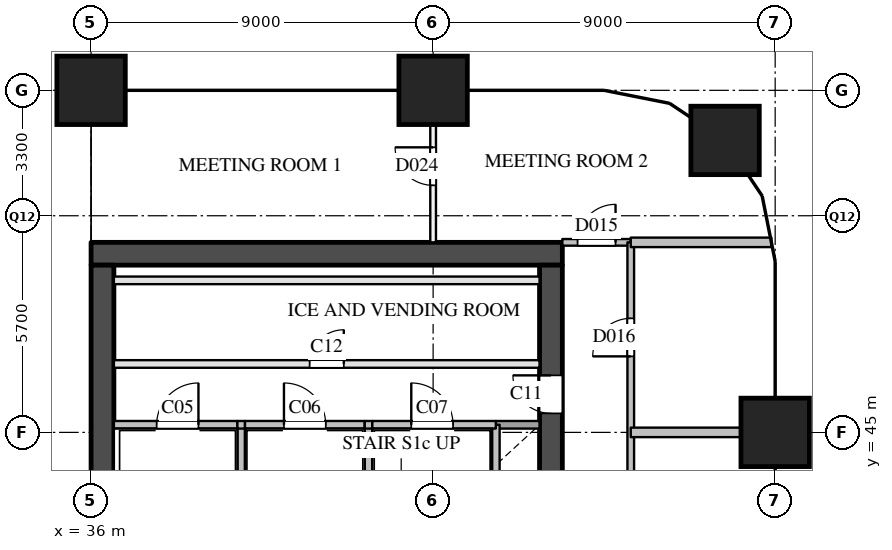
"""IFC4 building model, lengths in metres.
Left out: names, types, materials, properties, quantities, classifications, styles, units other than length and angle.
Written with IfcOpenShell. Run it as: python <this file> out.ifc"""

import sys

from ifc_helpers import new_model, si_unit, direction, frame, frame_2d, origin, origin_2d, place, context, subcontext, project, spatial, rectangle, extrude, element, fill, save


model = new_model("IFC4")
c1 = context("Model", 3, precision=1e-05, world=origin(), true_north=direction((0.0, 1.0)))
c2 = subcontext(c1, "Body", "Model", "MODEL_VIEW")
j1 = project(units=[si_unit("LENGTHUNIT", "METRE"), si_unit("PLANEANGLEUNIT", "RADIAN")], contexts=[c1])
p1 = place(None, origin())
s1 = spatial("IfcSite", under=j1, at=p1, CompositionType="ELEMENT")
p2 = place(p1, origin())
s2 = spatial("IfcBuilding", under=s1, at=p2, CompositionType="ELEMENT")
p3 = place(p2, frame((0.0, 0.0, 14.0)))
s3 = spatial("IfcBuildingStorey", under=s2, at=p3, CompositionType="ELEMENT", Elevation=14.0)
for number, where, z_axis, x_axis in (
    (1, (36.0, 54.0, 0.0), (0.0, 0.0, 1.0), (1.0, 0.0, 0.0)),
    (2, (45.0, 54.0, 0.0), (0.0, 0.0, 1.0), (1.0, 0.0, 0.0)),
    (3, (54.0, 45.0, 0.0), (0.0, 0.0, 1.0), (1.0, 0.0, 0.0)),
    (4, (52.682, 52.682, 0.0), (0.0, 0.0, 1.0), (1.0, 0.0, 0.0)),
):
    element("IfcColumn", number, at=place(p3, frame(where, z_axis=z_axis, x_axis=x_axis)), inside=s3, PredefinedType="COLUMN", context=c2, shape_type="SweptSolid", body=[
        extrude(rectangle(XDim=1.8, YDim=1.8, at=origin_2d()), origin(), (0.0, 0.0, 1.0), 7.0),
    ])
p4 = place(p3, frame((36.0, 49.7, 0.0), z_axis=(0.0, 0.0, 1.0), x_axis=(1.0, 0.0, 0.0)))
e5 = element("IfcWall", 5, at=p4, inside=s3, PredefinedType="SHEAR", context=c2, shape_type="SweptSolid", body=[
    extrude(rectangle(XDim=12.4, YDim=0.6, at=frame_2d((6.2, 0.0))), origin(), (0.0, 0.0, 1.0), 6.59),
])
p5 = place(p3, frame((36.3, 29.1, 0.0), z_axis=(0.0, 0.0, 1.0), x_axis=(0.0, 1.0, 0.0)))
e6 = element("IfcWall", 6, at=p5, inside=s3, PredefinedType="SHEAR", context=c2, shape_type="SweptSolid", body=[
    extrude(rectangle(XDim=20.3, YDim=0.6, at=frame_2d((10.15, 0.0))), origin(), (0.0, 0.0, 1.0), 6.59),
])
p6 = place(p3, frame((48.1, 29.1, 0.0), z_axis=(0.0, 0.0, 1.0), x_axis=(0.0, 1.0, 0.0)))
e7 = element("IfcWall", 7, at=p6, inside=s3, PredefinedType="SHEAR", context=c2, shape_type="SweptSolid", body=[
    extrude(rectangle(XDim=20.3, YDim=0.6, at=frame_2d((10.15, 0.0))), origin(), (0.0, 0.0, 1.0), 6.59),
])
p7 = place(p6, frame((12.5, 0.0, 0.0)))
e8 = element("IfcOpeningElement", 8, at=p7, cuts=e7, PredefinedType="OPENING", context=c2, shape_type="SweptSolid", body=[
    extrude(rectangle(XDim=0.7, YDim=2.1, at=frame_2d((0.35, 1.05))), frame((0.0, 0.31, 0.0), z_axis=(0.0, -1.0, 0.0), x_axis=(1.0, 0.0, 0.0)), (0.0, 0.0, 1.0), 0.62),
])
p8 = place(p6, frame((3.9, 0.0, 0.0)))
e9 = element("IfcOpeningElement", 9, at=p8, cuts=e7, PredefinedType="OPENING", context=c2, shape_type="SweptSolid", body=[
    extrude(rectangle(XDim=1.8, YDim=2.1, at=frame_2d((0.9, 1.05))), frame((0.0, 0.31, 0.0), z_axis=(0.0, -1.0, 0.0), x_axis=(1.0, 0.0, 0.0)), (0.0, 0.0, 1.0), 0.62),
])
p9 = place(p6, frame((16.4, 0.0, 0.0)))
e10 = element("IfcOpeningElement", 10, at=p9, cuts=e7, PredefinedType="OPENING", context=c2, shape_type="SweptSolid", body=[
    extrude(rectangle(XDim=1.0, YDim=2.1, at=frame_2d((0.5, 1.05))), frame((0.0, 0.31, 0.0), z_axis=(0.0, -1.0, 0.0), x_axis=(1.0, 0.0, 0.0)), (0.0, 0.0, 1.0), 0.62),
])
for number, where, z_axis, x_axis in (
    (11, (39.95, 43.58, 0.0), (0.0, 0.0, 1.0), (0.0, 1.0, 0.0)),
    (12, (43.3, 43.58, 0.0), (0.0, 0.0, 1.0), (0.0, 1.0, 0.0)),
    (13, (46.65, 43.58, 0.0), (0.0, 0.0, 1.0), (0.0, 1.0, 0.0)),
):
    element("IfcWall", number, at=place(p3, frame(where, z_axis=z_axis, x_axis=x_axis)), inside=s3, PredefinedType="SOLIDWALL", context=c2, shape_type="SweptSolid", body=[
        extrude(rectangle(XDim=1.62, YDim=0.2, at=frame_2d((0.81, 0.0))), origin(), (0.0, 0.0, 1.0), 6.59),
    ])
p10 = place(p3, frame((46.65, 45.2, 0.0), z_axis=(0.0, 0.0, 1.0), x_axis=(1.0, 0.0, 0.0)))
e14 = element("IfcWall", 14, at=p10, inside=s3, PredefinedType="SOLIDWALL", context=c2, shape_type="SweptSolid", body=[
    extrude(rectangle(XDim=1.15, YDim=0.2, at=frame_2d((0.575, 0.0))), origin(), (0.0, 0.0, 1.0), 6.59),
])
p11 = place(p3, frame((36.6, 45.2, 0.0), z_axis=(0.0, 0.0, 1.0), x_axis=(1.0, 0.0, 0.0)))
e15 = element("IfcWall", 15, at=p11, inside=s3, PredefinedType="SOLIDWALL", context=c2, shape_type="SweptSolid", body=[
    extrude(rectangle(XDim=3.25, YDim=0.2, at=frame_2d((1.625, 0.0))), origin(), (0.0, 0.0, 1.0), 6.59),
])
p12 = place(p11, frame((1.125, 0.0, 0.0)))
e16 = element("IfcOpeningElement", 16, at=p12, cuts=e15, PredefinedType="OPENING", context=c2, shape_type="SweptSolid", body=[
    extrude(rectangle(XDim=1.1, YDim=2.1, at=frame_2d((0.55, 1.05))), frame((0.0, 0.11, 0.0), z_axis=(0.0, -1.0, 0.0), x_axis=(1.0, 0.0, 0.0)), (0.0, 0.0, 1.0), 0.22),
])
p13 = place(p3, frame((39.85, 45.2, 0.0), z_axis=(0.0, 0.0, 1.0), x_axis=(1.0, 0.0, 0.0)))
e17 = element("IfcWall", 17, at=p13, inside=s3, PredefinedType="SOLIDWALL", context=c2, shape_type="SweptSolid", body=[
    extrude(rectangle(XDim=0.2, YDim=0.2, at=frame_2d((0.1, 0.0))), origin(), (0.0, 0.0, 1.0), 6.59),
])
p14 = place(p3, frame((40.05, 45.2, 0.0), z_axis=(0.0, 0.0, 1.0), x_axis=(1.0, 0.0, 0.0)))
e18 = element("IfcWall", 18, at=p14, inside=s3, PredefinedType="SOLIDWALL", context=c2, shape_type="SweptSolid", body=[
    extrude(rectangle(XDim=3.15, YDim=0.2, at=frame_2d((1.575, 0.0))), origin(), (0.0, 0.0, 1.0), 6.59),
])
p15 = place(p14, frame((1.025, 0.0, 0.0)))
e19 = element("IfcOpeningElement", 19, at=p15, cuts=e18, PredefinedType="OPENING", context=c2, shape_type="SweptSolid", body=[
    extrude(rectangle(XDim=1.1, YDim=2.1, at=frame_2d((0.55, 1.05))), frame((0.0, 0.11, 0.0), z_axis=(0.0, -1.0, 0.0), x_axis=(1.0, 0.0, 0.0)), (0.0, 0.0, 1.0), 0.22),
])
p16 = place(p3, frame((43.2, 45.2, 0.0), z_axis=(0.0, 0.0, 1.0), x_axis=(1.0, 0.0, 0.0)))
e20 = element("IfcWall", 20, at=p16, inside=s3, PredefinedType="SOLIDWALL", context=c2, shape_type="SweptSolid", body=[
    extrude(rectangle(XDim=0.2, YDim=0.2, at=frame_2d((0.1, 0.0))), origin(), (0.0, 0.0, 1.0), 6.59),
])
p17 = place(p3, frame((43.4, 45.2, 0.0), z_axis=(0.0, 0.0, 1.0), x_axis=(1.0, 0.0, 0.0)))
e21 = element("IfcWall", 21, at=p17, inside=s3, PredefinedType="SOLIDWALL", context=c2, shape_type="SweptSolid", body=[
    extrude(rectangle(XDim=3.25, YDim=0.2, at=frame_2d((1.625, 0.0))), origin(), (0.0, 0.0, 1.0), 6.59),
])
p18 = place(p17, frame((1.025, 0.0, 0.0)))
e22 = element("IfcOpeningElement", 22, at=p18, cuts=e21, PredefinedType="OPENING", context=c2, shape_type="SweptSolid", body=[
    extrude(rectangle(XDim=1.1, YDim=2.1, at=frame_2d((0.55, 1.05))), frame((0.0, 0.11, 0.0), z_axis=(0.0, -1.0, 0.0), x_axis=(1.0, 0.0, 0.0)), (0.0, 0.0, 1.0), 0.22),
])
p19 = place(p3, frame((36.6, 46.8, 0.0), z_axis=(0.0, 0.0, 1.0), x_axis=(1.0, 0.0, 0.0)))
e23 = element("IfcWall", 23, at=p19, inside=s3, PredefinedType="PARTITIONING", context=c2, shape_type="SweptSolid", body=[
    extrude(rectangle(XDim=11.2, YDim=0.2, at=frame_2d((5.6, 0.0))), origin(), (0.0, 0.0, 1.0), 6.59),
])
p20 = place(p19, frame((5.15, 0.0, 0.0)))
e24 = element("IfcOpeningElement", 24, at=p20, cuts=e23, PredefinedType="OPENING", context=c2, shape_type="SweptSolid", body=[
    extrude(rectangle(XDim=0.9, YDim=2.1, at=frame_2d((0.45, 1.05))), frame((0.0, 0.11, 0.0), z_axis=(0.0, -1.0, 0.0), x_axis=(1.0, 0.0, 0.0)), (0.0, 0.0, 1.0), 0.22),
])
p21 = place(p3, frame((36.6, 49.0, 0.0), z_axis=(0.0, 0.0, 1.0), x_axis=(1.0, 0.0, 0.0)))
e25 = element("IfcWall", 25, at=p21, inside=s3, PredefinedType="PARTITIONING", context=c2, shape_type="SweptSolid", body=[
    extrude(rectangle(XDim=11.2, YDim=0.2, at=frame_2d((5.6, 0.0))), origin(), (0.0, 0.0, 1.0), 6.59),
])
p22 = place(p3, frame((48.4, 50.0, 0.0), z_axis=(0.0, 0.0, 1.0), x_axis=(1.0, 0.0, 0.0)))
e26 = element("IfcWall", 26, at=p22, inside=s3, PredefinedType="PARTITIONING", context=c2, shape_type="SweptSolid", body=[
    extrude(rectangle(XDim=1.8, YDim=0.175, at=frame_2d((0.9, 0.0))), origin(), (0.0, 0.0, 1.0), 6.59),
])
p23 = place(p22, frame((0.4, 0.0, 0.0)))
e27 = element("IfcOpeningElement", 27, at=p23, cuts=e26, PredefinedType="OPENING", context=c2, shape_type="SweptSolid", body=[
    extrude(rectangle(XDim=1.0, YDim=2.1, at=frame_2d((0.5, 1.05))), frame((0.0, 0.097, 0.0), z_axis=(0.0, -1.0, 0.0), x_axis=(1.0, 0.0, 0.0)), (0.0, 0.0, 1.0), 0.195),
])
p24 = place(p3, frame((50.2, 28.5, 0.0), z_axis=(0.0, 0.0, 1.0), x_axis=(0.0, 1.0, 0.0)))
e28 = element("IfcWall", 28, at=p24, inside=s3, PredefinedType="PARTITIONING", context=c2, shape_type="SweptSolid", body=[
    extrude(rectangle(XDim=21.5, YDim=0.175, at=frame_2d((10.75, 0.0))), origin(), (0.0, 0.0, 1.0), 6.59),
])
p25 = place(p24, frame((18.5, 0.0, 0.0)))
e29 = element("IfcOpeningElement", 29, at=p25, cuts=e28, PredefinedType="OPENING", context=c2, shape_type="SweptSolid", body=[
    extrude(rectangle(XDim=1.0, YDim=2.1, at=frame_2d((0.5, 1.05))), frame((0.0, 0.097, 0.0), z_axis=(0.0, -1.0, 0.0), x_axis=(1.0, 0.0, 0.0)), (0.0, 0.0, 1.0), 0.195),
])
p26 = place(p24, frame((7.75, 0.0, 0.0)))
e30 = element("IfcOpeningElement", 30, at=p26, cuts=e28, PredefinedType="OPENING", context=c2, shape_type="SweptSolid", body=[
    extrude(rectangle(XDim=1.0, YDim=2.1, at=frame_2d((0.5, 1.05))), frame((0.0, 0.097, 0.0), z_axis=(0.0, -1.0, 0.0), x_axis=(1.0, 0.0, 0.0)), (0.0, 0.0, 1.0), 0.195),
])
p27 = place(p3, frame((45.0, 50.0, 0.0), z_axis=(0.0, 0.0, 1.0), x_axis=(0.0, 1.0, 0.0)))
e31 = element("IfcWall", 31, at=p27, inside=s3, PredefinedType="PARTITIONING", context=c2, shape_type="SweptSolid", body=[
    extrude(rectangle(XDim=4.0, YDim=0.15, at=frame_2d((2.0, 0.0))), origin(), (0.0, 0.0, 1.0), 6.59),
])
p28 = place(p27, frame((1.5, 0.0, 0.0)))
e32 = element("IfcOpeningElement", 32, at=p28, cuts=e31, PredefinedType="OPENING", context=c2, shape_type="SweptSolid", body=[
    extrude(rectangle(XDim=1.0, YDim=2.1, at=frame_2d((0.5, 1.05))), frame((0.0, 0.085, 0.0), z_axis=(0.0, -1.0, 0.0), x_axis=(1.0, 0.0, 0.0)), (0.0, 0.0, 1.0), 0.17),
])
p29 = place(p3, frame((50.2, 45.0, 0.0), z_axis=(0.0, 0.0, 1.0), x_axis=(1.0, 0.0, 0.0)))
e33 = element("IfcWall", 33, at=p29, inside=s3, PredefinedType="PARTITIONING", context=c2, shape_type="SweptSolid", body=[
    extrude(rectangle(XDim=3.8, YDim=0.25, at=frame_2d((1.9, 0.0))), origin(), (0.0, 0.0, 1.0), 6.59),
])
p30 = place(p3, frame((50.2, 50.0, 0.0), z_axis=(0.0, 0.0, 1.0), x_axis=(1.0, 0.0, 0.0)))
e34 = element("IfcWall", 34, at=p30, inside=s3, PredefinedType="PARTITIONING", context=c2, shape_type="SweptSolid", body=[
    extrude(rectangle(XDim=3.7, YDim=0.25, at=frame_2d((1.85, 0.0))), origin(), (0.0, 0.0, 1.0), 5.59),
])
p31 = place(p12, origin())
e35 = element("IfcDoor", 35, at=p31, inside=s3, OperationType="SINGLE_SWING_RIGHT", PredefinedType="DOOR", context=c2, shape_type="SweptSolid", body=[
    extrude(rectangle(XDim=1.1, YDim=2.1, at=frame_2d((0.55, 1.05))), frame((0.0, 0.025, 0.0), z_axis=(0.0, -1.0, 0.0), x_axis=(1.0, 0.0, 0.0)), (0.0, 0.0, 1.0), 0.05),
])
fill(e16, e35)
p32 = place(p15, origin())
e36 = element("IfcDoor", 36, at=p32, inside=s3, OperationType="SINGLE_SWING_LEFT", PredefinedType="DOOR", context=c2, shape_type="SweptSolid", body=[
    extrude(rectangle(XDim=1.1, YDim=2.1, at=frame_2d((0.55, 1.05))), frame((0.0, 0.025, 0.0), z_axis=(0.0, -1.0, 0.0), x_axis=(1.0, 0.0, 0.0)), (0.0, 0.0, 1.0), 0.05),
])
fill(e19, e36)
p33 = place(p18, origin())
e37 = element("IfcDoor", 37, at=p33, inside=s3, OperationType="SINGLE_SWING_LEFT", PredefinedType="DOOR", context=c2, shape_type="SweptSolid", body=[
    extrude(rectangle(XDim=1.1, YDim=2.1, at=frame_2d((0.55, 1.05))), frame((0.0, 0.025, 0.0), z_axis=(0.0, -1.0, 0.0), x_axis=(1.0, 0.0, 0.0)), (0.0, 0.0, 1.0), 0.05),
])
fill(e22, e37)
p34 = place(p9, origin())
e38 = element("IfcDoor", 38, at=p34, inside=s3, OperationType="SINGLE_SWING_RIGHT", PredefinedType="DOOR", context=c2, shape_type="SweptSolid", body=[
    extrude(rectangle(XDim=1.0, YDim=2.1, at=frame_2d((0.5, 1.05))), frame((0.0, 0.025, 0.0), z_axis=(0.0, -1.0, 0.0), x_axis=(1.0, 0.0, 0.0)), (0.0, 0.0, 1.0), 0.05),
])
fill(e10, e38)
p35 = place(p20, origin())
e39 = element("IfcDoor", 39, at=p35, inside=s3, OperationType="SINGLE_SWING_RIGHT", PredefinedType="DOOR", context=c2, shape_type="SweptSolid", body=[
    extrude(rectangle(XDim=0.9, YDim=2.1, at=frame_2d((0.45, 1.05))), frame((0.0, 0.025, 0.0), z_axis=(0.0, -1.0, 0.0), x_axis=(1.0, 0.0, 0.0)), (0.0, 0.0, 1.0), 0.05),
])
fill(e24, e39)
p36 = place(p23, origin())
e40 = element("IfcDoor", 40, at=p36, inside=s3, OperationType="SINGLE_SWING_RIGHT", PredefinedType="DOOR", context=c2, shape_type="SweptSolid", body=[
    extrude(rectangle(XDim=1.0, YDim=2.1, at=frame_2d((0.5, 1.05))), frame((0.0, 0.025, 0.0), z_axis=(0.0, -1.0, 0.0), x_axis=(1.0, 0.0, 0.0)), (0.0, 0.0, 1.0), 0.05),
])
fill(e27, e40)
p37 = place(p25, origin())
e41 = element("IfcDoor", 41, at=p37, inside=s3, OperationType="SINGLE_SWING_LEFT", PredefinedType="DOOR", context=c2, shape_type="SweptSolid", body=[
    extrude(rectangle(XDim=1.0, YDim=2.1, at=frame_2d((0.5, 1.05))), frame((0.0, 0.025, 0.0), z_axis=(0.0, -1.0, 0.0), x_axis=(1.0, 0.0, 0.0)), (0.0, 0.0, 1.0), 0.05),
])
fill(e29, e41)
p38 = place(p28, origin())
e42 = element("IfcDoor", 42, at=p38, inside=s3, OperationType="SINGLE_SWING_RIGHT", PredefinedType="DOOR", context=c2, shape_type="SweptSolid", body=[
    extrude(rectangle(XDim=1.0, YDim=2.1, at=frame_2d((0.5, 1.05))), frame((0.0, 0.025, 0.0), z_axis=(0.0, -1.0, 0.0), x_axis=(1.0, 0.0, 0.0)), (0.0, 0.0, 1.0), 0.05),
])
fill(e32, e42)
save(model, sys.argv[1])
